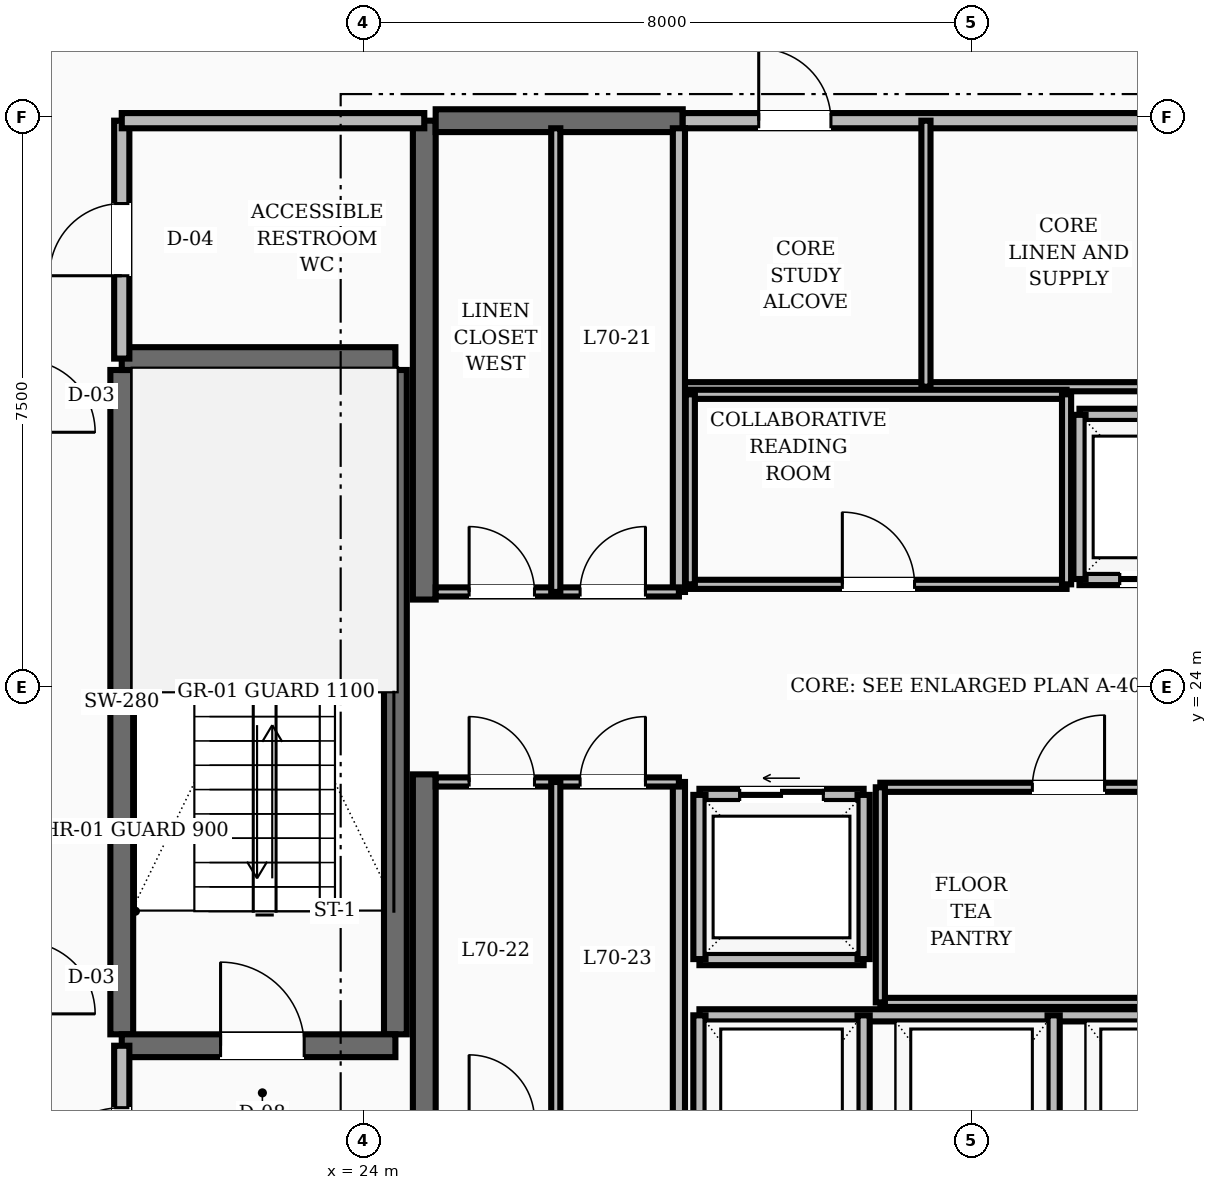
"""IFC4 building model, lengths in metres.
Left out: names, types, materials, properties, quantities, classifications, styles, units other than length and angle.
Written with IfcOpenShell. Run it as: python <this file> out.ifc"""

import sys

from ifc_helpers import new_model, si_unit, direction, frame, frame_2d, origin, place, context, subcontext, project, spatial, rectangle, extrude, element, fill, save


model = new_model("IFC4")
c1 = context("Model", 3, precision=1e-05, world=origin(), true_north=direction((0.0, 1.0)))
c2 = subcontext(c1, "Body", "Model", "MODEL_VIEW")
j1 = project(units=[si_unit("LENGTHUNIT", "METRE"), si_unit("PLANEANGLEUNIT", "RADIAN")], contexts=[c1])
p1 = place(None, origin())
s1 = spatial("IfcSite", under=j1, at=p1, CompositionType="ELEMENT")
p2 = place(p1, origin())
s2 = spatial("IfcBuilding", under=s1, at=p2, CompositionType="ELEMENT")
p3 = place(p2, frame((0.0, 0.0, 268.8)))
s3 = spatial("IfcBuildingStorey", under=s2, at=p3, CompositionType="ELEMENT", Elevation=268.8)
for number, where, z_axis, x_axis in (
    (1, (24.8, 16.55, 0.0), (0.0, 0.0, 1.0), (0.0, 1.0, 0.0)),
    (2, (24.8, 25.15, 0.0), (0.0, 0.0, 1.0), (0.0, 1.0, 0.0)),
):
    element("IfcWall", number, at=place(p3, frame(where, z_axis=z_axis, x_axis=x_axis)), inside=s3, PredefinedType="SHEAR", context=c2, shape_type="SweptSolid", body=[
        extrude(rectangle(XDim=6.3, YDim=0.3, at=frame_2d((3.15, 0.0))), origin(), (0.0, 0.0, 1.0), 3.6),
    ])
p4 = place(p3, frame((24.95, 31.45, 0.0), z_axis=(0.0, 0.0, 1.0), x_axis=(1.0, 0.0, 0.0)))
e3 = element("IfcWall", 3, at=p4, inside=s3, PredefinedType="SHEAR", context=c2, shape_type="SweptSolid", body=[
    extrude(rectangle(XDim=3.25, YDim=0.3, at=frame_2d((1.625, 0.0))), origin(), (0.0, 0.0, 1.0), 3.6),
])
for number, where, z_axis, x_axis in (
    (4, (20.82, 19.43, 0.0), (0.0, 0.0, 1.0), (0.0, 1.0, 0.0)),
    (5, (24.42, 19.43, 0.0), (0.0, 0.0, 1.0), (0.0, 1.0, 0.0)),
):
    element("IfcWall", number, at=place(p3, frame(where, z_axis=z_axis, x_axis=x_axis)), inside=s3, PredefinedType="SHEAR", context=c2, shape_type="SweptSolid", body=[
        extrude(rectangle(XDim=8.74, YDim=0.3, at=frame_2d((4.37, 0.0))), origin(), (0.0, 0.0, 1.0), 3.6),
    ])
p5 = place(p3, frame((20.82, 19.28, 0.0), z_axis=(0.0, 0.0, 1.0), x_axis=(1.0, 0.0, 0.0)))
e6 = element("IfcWall", 6, at=p5, inside=s3, PredefinedType="SHEAR", context=c2, shape_type="SweptSolid", body=[
    extrude(rectangle(XDim=3.6, YDim=0.3, at=frame_2d((1.8, 0.0))), origin(), (0.0, 0.0, 1.0), 3.6),
])
p6 = place(p5, frame((1.3, 0.0, 0.0)))
e7 = element("IfcOpeningElement", 7, at=p6, cuts=e6, PredefinedType="OPENING", context=c2, shape_type="SweptSolid", body=[
    extrude(rectangle(XDim=1.1, YDim=2.1, at=frame_2d((0.55, 1.05))), frame((0.0, 0.16, 0.0), z_axis=(0.0, -1.0, 0.0), x_axis=(1.0, 0.0, 0.0)), (0.0, 0.0, 1.0), 0.32),
])
p7 = place(p3, frame((20.82, 28.32, 0.0), z_axis=(0.0, 0.0, 1.0), x_axis=(1.0, 0.0, 0.0)))
e8 = element("IfcWall", 8, at=p7, inside=s3, PredefinedType="SHEAR", context=c2, shape_type="SweptSolid", body=[
    extrude(rectangle(XDim=3.6, YDim=0.3, at=frame_2d((1.8, 0.0))), origin(), (0.0, 0.0, 1.0), 3.6),
])
p8 = place(p3, frame((20.82, 16.55, 0.0), z_axis=(0.0, 0.0, 1.0), x_axis=(0.0, 1.0, 0.0)))
e9 = element("IfcWall", 9, at=p8, inside=s3, PredefinedType="SOLIDWALL", context=c2, shape_type="SweptSolid", body=[
    extrude(rectangle(XDim=2.73, YDim=0.2, at=frame_2d((1.365, 0.0))), origin(), (0.0, 0.0, 1.0), 2.87),
])
p9 = place(p8, frame((0.815, 0.0, 0.0)))
e10 = element("IfcOpeningElement", 10, at=p9, cuts=e9, PredefinedType="OPENING", context=c2, shape_type="SweptSolid", body=[
    extrude(rectangle(XDim=1.1, YDim=2.1, at=frame_2d((0.55, 1.05))), frame((0.0, 0.11, 0.0), z_axis=(0.0, -1.0, 0.0), x_axis=(1.0, 0.0, 0.0)), (0.0, 0.0, 1.0), 0.22),
])
p10 = place(p3, frame((20.82, 28.32, 0.0), z_axis=(0.0, 0.0, 1.0), x_axis=(0.0, 1.0, 0.0)))
e11 = element("IfcWall", 11, at=p10, inside=s3, PredefinedType="SOLIDWALL", context=c2, shape_type="SweptSolid", body=[
    extrude(rectangle(XDim=3.13, YDim=0.2, at=frame_2d((1.565, 0.0))), origin(), (0.0, 0.0, 1.0), 2.87),
])
p11 = place(p10, frame((1.09, 0.0, 0.0)))
e12 = element("IfcOpeningElement", 12, at=p11, cuts=e11, PredefinedType="OPENING", context=c2, shape_type="SweptSolid", body=[
    extrude(rectangle(XDim=0.95, YDim=2.1, at=frame_2d((0.475, 1.05))), frame((0.0, 0.11, 0.0), z_axis=(0.0, -1.0, 0.0), x_axis=(1.0, 0.0, 0.0)), (0.0, 0.0, 1.0), 0.22),
])
p12 = place(p3, frame((20.82, 31.45, 0.0), z_axis=(0.0, 0.0, 1.0), x_axis=(1.0, 0.0, 0.0)))
e13 = element("IfcWall", 13, at=p12, inside=s3, PredefinedType="SOLIDWALL", context=c2, shape_type="SweptSolid", body=[
    extrude(rectangle(XDim=3.98, YDim=0.2, at=frame_2d((1.99, 0.0))), origin(), (0.0, 0.0, 1.0), 2.87),
])
p13 = place(p3, frame((33.42, 25.42, 0.0), z_axis=(0.0, 0.0, 1.0), x_axis=(1.0, 0.0, 0.0)))
e14 = element("IfcWall", 14, at=p13, inside=s3, PredefinedType="SOLIDWALL", context=c2, shape_type="SweptSolid", body=[
    extrude(rectangle(XDim=2.16, YDim=0.16, at=frame_2d((1.08, 0.0))), origin(), (0.0, 0.0, 1.0), 2.87),
])
p14 = place(p13, frame((0.53, 0.0, 0.0)))
e15 = element("IfcOpeningElement", 15, at=p14, cuts=e14, PredefinedType="OPENING", context=c2, shape_type="SweptSolid", body=[
    extrude(rectangle(XDim=1.1, YDim=2.15, at=frame_2d((0.55, 1.075))), frame((0.0, 0.09, 0.0), z_axis=(0.0, -1.0, 0.0), x_axis=(1.0, 0.0, 0.0)), (0.0, 0.0, 1.0), 0.18),
])
for number, where, z_axis, x_axis in (
    (16, (33.42, 27.58, 0.0), (0.0, 0.0, 1.0), (1.0, 0.0, 0.0)),
    (17, (33.42, 25.42, 0.0), (0.0, 0.0, 1.0), (0.0, 1.0, 0.0)),
):
    element("IfcWall", number, at=place(p3, frame(where, z_axis=z_axis, x_axis=x_axis)), inside=s3, PredefinedType="SOLIDWALL", context=c2, shape_type="SweptSolid", body=[
        extrude(rectangle(XDim=2.16, YDim=0.16, at=frame_2d((1.08, 0.0))), origin(), (0.0, 0.0, 1.0), 2.87),
    ])
p15 = place(p3, frame((28.42, 22.58, 0.0), z_axis=(0.0, 0.0, 1.0), x_axis=(1.0, 0.0, 0.0)))
e18 = element("IfcWall", 18, at=p15, inside=s3, PredefinedType="SOLIDWALL", context=c2, shape_type="SweptSolid", body=[
    extrude(rectangle(XDim=2.16, YDim=0.16, at=frame_2d((1.08, 0.0))), origin(), (0.0, 0.0, 1.0), 2.87),
])
p16 = place(p15, frame((0.53, 0.0, 0.0)))
e19 = element("IfcOpeningElement", 19, at=p16, cuts=e18, PredefinedType="OPENING", context=c2, shape_type="SweptSolid", body=[
    extrude(rectangle(XDim=1.1, YDim=2.15, at=frame_2d((0.55, 1.075))), frame((0.0, 0.09, 0.0), z_axis=(0.0, -1.0, 0.0), x_axis=(1.0, 0.0, 0.0)), (0.0, 0.0, 1.0), 0.18),
])
for number, where, z_axis, x_axis in (
    (20, (28.42, 20.42, 0.0), (0.0, 0.0, 1.0), (1.0, 0.0, 0.0)),
    (21, (28.42, 20.42, 0.0), (0.0, 0.0, 1.0), (0.0, 1.0, 0.0)),
    (22, (30.58, 20.42, 0.0), (0.0, 0.0, 1.0), (0.0, 1.0, 0.0)),
):
    element("IfcWall", number, at=place(p3, frame(where, z_axis=z_axis, x_axis=x_axis)), inside=s3, PredefinedType="SOLIDWALL", context=c2, shape_type="SweptSolid", body=[
        extrude(rectangle(XDim=2.16, YDim=0.16, at=frame_2d((1.08, 0.0))), origin(), (0.0, 0.0, 1.0), 2.87),
    ])
p17 = place(p3, frame((28.42, 19.68, 0.0), z_axis=(0.0, 0.0, 1.0), x_axis=(1.0, 0.0, 0.0)))
e23 = element("IfcWall", 23, at=p17, inside=s3, PredefinedType="SOLIDWALL", context=c2, shape_type="SweptSolid", body=[
    extrude(rectangle(XDim=7.16, YDim=0.16, at=frame_2d((3.58, 0.0))), origin(), (0.0, 0.0, 1.0), 2.87),
])
for number, where, z_axis, x_axis in (
    (24, (28.42, 16.92, 0.0), (0.0, 0.0, 1.0), (0.0, 1.0, 0.0)),
    (25, (30.58, 16.92, 0.0), (0.0, 0.0, 1.0), (0.0, 1.0, 0.0)),
    (26, (33.08, 16.92, 0.0), (0.0, 0.0, 1.0), (0.0, 1.0, 0.0)),
):
    element("IfcWall", number, at=place(p3, frame(where, z_axis=z_axis, x_axis=x_axis)), inside=s3, PredefinedType="SOLIDWALL", context=c2, shape_type="SweptSolid", body=[
        extrude(rectangle(XDim=2.76, YDim=0.16, at=frame_2d((1.38, 0.0))), origin(), (0.0, 0.0, 1.0), 2.87),
    ])
p18 = place(p3, frame((28.2, 31.45, 0.0), z_axis=(0.0, 0.0, 1.0), x_axis=(1.0, 0.0, 0.0)))
e27 = element("IfcWall", 27, at=p18, inside=s3, PredefinedType="SOLIDWALL", context=c2, shape_type="SweptSolid", body=[
    extrude(rectangle(XDim=7.6, YDim=0.2, at=frame_2d((3.8, 0.0))), origin(), (0.0, 0.0, 1.0), 2.87),
])
p19 = place(p18, frame((1.0, 0.0, 0.0)))
e28 = element("IfcOpeningElement", 28, at=p19, cuts=e27, PredefinedType="OPENING", context=c2, shape_type="SweptSolid", body=[
    extrude(rectangle(XDim=0.95, YDim=2.1, at=frame_2d((0.475, 1.05))), frame((0.0, 0.11, 0.0), z_axis=(0.0, -1.0, 0.0), x_axis=(1.0, 0.0, 0.0)), (0.0, 0.0, 1.0), 0.22),
])
p20 = place(p3, frame((28.2, 27.95, 0.0), z_axis=(0.0, 0.0, 1.0), x_axis=(1.0, 0.0, 0.0)))
e29 = element("IfcWall", 29, at=p20, inside=s3, PredefinedType="PARTITIONING", context=c2, shape_type="SweptSolid", body=[
    extrude(rectangle(XDim=7.6, YDim=0.12, at=frame_2d((3.8, 0.0))), origin(), (0.0, 0.0, 1.0), 2.87),
])
p21 = place(p3, frame((31.4, 27.95, 0.0), z_axis=(0.0, 0.0, 1.0), x_axis=(0.0, 1.0, 0.0)))
e30 = element("IfcWall", 30, at=p21, inside=s3, PredefinedType="PARTITIONING", context=c2, shape_type="SweptSolid", body=[
    extrude(rectangle(XDim=3.5, YDim=0.12, at=frame_2d((1.75, 0.0))), origin(), (0.0, 0.0, 1.0), 2.87),
])
p22 = place(p3, frame((28.3, 25.35, 0.0), z_axis=(0.0, 0.0, 1.0), x_axis=(1.0, 0.0, 0.0)))
e31 = element("IfcWall", 31, at=p22, inside=s3, PredefinedType="PARTITIONING", context=c2, shape_type="SweptSolid", body=[
    extrude(rectangle(XDim=4.95, YDim=0.12, at=frame_2d((2.475, 0.0))), origin(), (0.0, 0.0, 1.0), 2.87),
])
p23 = place(p22, frame((2.0, 0.0, 0.0)))
e32 = element("IfcOpeningElement", 32, at=p23, cuts=e31, PredefinedType="OPENING", context=c2, shape_type="SweptSolid", body=[
    extrude(rectangle(XDim=0.95, YDim=2.1, at=frame_2d((0.475, 1.05))), frame((0.0, 0.07, 0.0), z_axis=(0.0, -1.0, 0.0), x_axis=(1.0, 0.0, 0.0)), (0.0, 0.0, 1.0), 0.14),
])
p24 = place(p3, frame((28.3, 27.85, 0.0), z_axis=(0.0, 0.0, 1.0), x_axis=(1.0, 0.0, 0.0)))
e33 = element("IfcWall", 33, at=p24, inside=s3, PredefinedType="PARTITIONING", context=c2, shape_type="SweptSolid", body=[
    extrude(rectangle(XDim=4.95, YDim=0.12, at=frame_2d((2.475, 0.0))), origin(), (0.0, 0.0, 1.0), 2.87),
])
for number, where, z_axis, x_axis in (
    (34, (28.3, 25.35, 0.0), (0.0, 0.0, 1.0), (0.0, 1.0, 0.0)),
    (35, (33.25, 25.35, 0.0), (0.0, 0.0, 1.0), (0.0, 1.0, 0.0)),
):
    element("IfcWall", number, at=place(p3, frame(where, z_axis=z_axis, x_axis=x_axis)), inside=s3, PredefinedType="PARTITIONING", context=c2, shape_type="SweptSolid", body=[
        extrude(rectangle(XDim=2.5, YDim=0.12, at=frame_2d((1.25, 0.0))), origin(), (0.0, 0.0, 1.0), 2.87),
    ])
p25 = place(p3, frame((30.8, 22.68, 0.0), z_axis=(0.0, 0.0, 1.0), x_axis=(1.0, 0.0, 0.0)))
e36 = element("IfcWall", 36, at=p25, inside=s3, PredefinedType="PARTITIONING", context=c2, shape_type="SweptSolid", body=[
    extrude(rectangle(XDim=4.95, YDim=0.12, at=frame_2d((2.475, 0.0))), origin(), (0.0, 0.0, 1.0), 2.87),
])
p26 = place(p25, frame((2.0, 0.0, 0.0)))
e37 = element("IfcOpeningElement", 37, at=p26, cuts=e36, PredefinedType="OPENING", context=c2, shape_type="SweptSolid", body=[
    extrude(rectangle(XDim=0.95, YDim=2.1, at=frame_2d((0.475, 1.05))), frame((0.0, 0.07, 0.0), z_axis=(0.0, -1.0, 0.0), x_axis=(1.0, 0.0, 0.0)), (0.0, 0.0, 1.0), 0.14),
])
p27 = place(p3, frame((30.8, 19.85, 0.0), z_axis=(0.0, 0.0, 1.0), x_axis=(1.0, 0.0, 0.0)))
e38 = element("IfcWall", 38, at=p27, inside=s3, PredefinedType="PARTITIONING", context=c2, shape_type="SweptSolid", body=[
    extrude(rectangle(XDim=4.95, YDim=0.12, at=frame_2d((2.475, 0.0))), origin(), (0.0, 0.0, 1.0), 2.87),
])
p28 = place(p3, frame((30.8, 19.85, 0.0), z_axis=(0.0, 0.0, 1.0), x_axis=(0.0, 1.0, 0.0)))
e39 = element("IfcWall", 39, at=p28, inside=s3, PredefinedType="PARTITIONING", context=c2, shape_type="SweptSolid", body=[
    extrude(rectangle(XDim=2.83, YDim=0.12, at=frame_2d((1.415, 0.0))), origin(), (0.0, 0.0, 1.0), 2.87),
])
p29 = place(p3, frame((28.15, 16.7, 0.0), z_axis=(0.0, 0.0, 1.0), x_axis=(0.0, 1.0, 0.0)))
e40 = element("IfcWall", 40, at=p29, inside=s3, PredefinedType="SOLIDWALL", context=c2, shape_type="SweptSolid", body=[
    extrude(rectangle(XDim=6.05, YDim=0.16, at=frame_2d((3.025, 0.0))), origin(), (0.0, 0.0, 1.0), 2.87),
])
p30 = place(p3, frame((28.15, 25.25, 0.0), z_axis=(0.0, 0.0, 1.0), x_axis=(0.0, 1.0, 0.0)))
e41 = element("IfcWall", 41, at=p30, inside=s3, PredefinedType="SOLIDWALL", context=c2, shape_type="SweptSolid", body=[
    extrude(rectangle(XDim=6.1, YDim=0.16, at=frame_2d((3.05, 0.0))), origin(), (0.0, 0.0, 1.0), 2.87),
])
p31 = place(p3, frame((24.95, 25.25, 0.0), z_axis=(0.0, 0.0, 1.0), x_axis=(1.0, 0.0, 0.0)))
e42 = element("IfcWall", 42, at=p31, inside=s3, PredefinedType="PARTITIONING", context=c2, shape_type="SweptSolid", body=[
    extrude(rectangle(XDim=3.2, YDim=0.12, at=frame_2d((1.6, 0.0))), origin(), (0.0, 0.0, 1.0), 2.87),
])
p32 = place(p31, frame((0.44, 0.0, 0.0)))
e43 = element("IfcOpeningElement", 43, at=p32, cuts=e42, PredefinedType="OPENING", context=c2, shape_type="SweptSolid", body=[
    extrude(rectangle(XDim=0.86, YDim=2.1, at=frame_2d((0.43, 1.05))), frame((0.0, 0.07, 0.0), z_axis=(0.0, -1.0, 0.0), x_axis=(1.0, 0.0, 0.0)), (0.0, 0.0, 1.0), 0.14),
])
p33 = place(p31, frame((1.9, 0.0, 0.0)))
e44 = element("IfcOpeningElement", 44, at=p33, cuts=e42, PredefinedType="OPENING", context=c2, shape_type="SweptSolid", body=[
    extrude(rectangle(XDim=0.86, YDim=2.1, at=frame_2d((0.43, 1.05))), frame((0.0, 0.07, 0.0), z_axis=(0.0, -1.0, 0.0), x_axis=(1.0, 0.0, 0.0)), (0.0, 0.0, 1.0), 0.14),
])
p34 = place(p3, frame((24.95, 22.75, 0.0), z_axis=(0.0, 0.0, 1.0), x_axis=(1.0, 0.0, 0.0)))
e45 = element("IfcWall", 45, at=p34, inside=s3, PredefinedType="PARTITIONING", context=c2, shape_type="SweptSolid", body=[
    extrude(rectangle(XDim=3.2, YDim=0.12, at=frame_2d((1.6, 0.0))), origin(), (0.0, 0.0, 1.0), 2.87),
])
p35 = place(p34, frame((0.44, 0.0, 0.0)))
e46 = element("IfcOpeningElement", 46, at=p35, cuts=e45, PredefinedType="OPENING", context=c2, shape_type="SweptSolid", body=[
    extrude(rectangle(XDim=0.86, YDim=2.1, at=frame_2d((0.43, 1.05))), frame((0.0, 0.07, 0.0), z_axis=(0.0, -1.0, 0.0), x_axis=(1.0, 0.0, 0.0)), (0.0, 0.0, 1.0), 0.14),
])
p36 = place(p34, frame((1.9, 0.0, 0.0)))
e47 = element("IfcOpeningElement", 47, at=p36, cuts=e45, PredefinedType="OPENING", context=c2, shape_type="SweptSolid", body=[
    extrude(rectangle(XDim=0.86, YDim=2.1, at=frame_2d((0.43, 1.05))), frame((0.0, 0.07, 0.0), z_axis=(0.0, -1.0, 0.0), x_axis=(1.0, 0.0, 0.0)), (0.0, 0.0, 1.0), 0.14),
])
p37 = place(p3, frame((26.53, 25.25, 0.0), z_axis=(0.0, 0.0, 1.0), x_axis=(0.0, 1.0, 0.0)))
e48 = element("IfcWall", 48, at=p37, inside=s3, PredefinedType="PARTITIONING", context=c2, shape_type="SweptSolid", body=[
    extrude(rectangle(XDim=6.1, YDim=0.12, at=frame_2d((3.05, 0.0))), origin(), (0.0, 0.0, 1.0), 2.87),
])
p38 = place(p3, frame((26.53, 18.3, 0.0), z_axis=(0.0, 0.0, 1.0), x_axis=(0.0, 1.0, 0.0)))
e49 = element("IfcWall", 49, at=p38, inside=s3, PredefinedType="PARTITIONING", context=c2, shape_type="SweptSolid", body=[
    extrude(rectangle(XDim=4.45, YDim=0.12, at=frame_2d((2.225, 0.0))), origin(), (0.0, 0.0, 1.0), 2.87),
])
p39 = place(p3, frame((21.635, 34.365, 0.0), z_axis=(0.0, 0.0, 1.0), x_axis=(-0.707106781187, -0.707106781187, 0.0)))
e50 = element("IfcWall", 50, at=p39, inside=s3, PredefinedType="SOLIDWALL", context=c2, shape_type="SweptSolid", body=[
    extrude(rectangle(XDim=2.916, YDim=0.16, at=frame_2d((1.458, 0.0))), origin(), (0.0, 0.0, 1.0), 2.87),
])
p40 = place(p6, origin())
e51 = element("IfcDoor", 51, at=p40, inside=s3, OperationType="SINGLE_SWING_LEFT", PredefinedType="DOOR", context=c2, shape_type="SweptSolid", body=[
    extrude(rectangle(XDim=1.1, YDim=2.1, at=frame_2d((0.55, 1.05))), frame((0.0, 0.025, 0.0), z_axis=(0.0, -1.0, 0.0), x_axis=(1.0, 0.0, 0.0)), (0.0, 0.0, 1.0), 0.05),
])
fill(e7, e51)
p41 = place(p9, origin())
e52 = element("IfcDoor", 52, at=p41, inside=s3, OperationType="SINGLE_SWING_LEFT", PredefinedType="DOOR", context=c2, shape_type="SweptSolid", body=[
    extrude(rectangle(XDim=1.1, YDim=2.1, at=frame_2d((0.55, 1.05))), frame((0.0, 0.025, 0.0), z_axis=(0.0, -1.0, 0.0), x_axis=(1.0, 0.0, 0.0)), (0.0, 0.0, 1.0), 0.05),
])
fill(e10, e52)
p42 = place(p11, origin())
e53 = element("IfcDoor", 53, at=p42, inside=s3, OperationType="SINGLE_SWING_LEFT", PredefinedType="DOOR", context=c2, shape_type="SweptSolid", body=[
    extrude(rectangle(XDim=0.95, YDim=2.1, at=frame_2d((0.475, 1.05))), frame((0.0, 0.025, 0.0), z_axis=(0.0, -1.0, 0.0), x_axis=(1.0, 0.0, 0.0)), (0.0, 0.0, 1.0), 0.05),
])
fill(e12, e53)
p43 = place(p14, origin())
e54 = element("IfcDoor", 54, at=p43, inside=s3, OperationType="SLIDING_TO_RIGHT", PredefinedType="DOOR", context=c2, shape_type="SweptSolid", body=[
    extrude(rectangle(XDim=1.1, YDim=2.15, at=frame_2d((0.55, 1.075))), frame((0.0, 0.025, 0.0), z_axis=(0.0, -1.0, 0.0), x_axis=(1.0, 0.0, 0.0)), (0.0, 0.0, 1.0), 0.05),
])
fill(e15, e54)
p44 = place(p16, origin())
e55 = element("IfcDoor", 55, at=p44, inside=s3, OperationType="SLIDING_TO_LEFT", PredefinedType="DOOR", context=c2, shape_type="SweptSolid", body=[
    extrude(rectangle(XDim=1.1, YDim=2.15, at=frame_2d((0.55, 1.075))), frame((0.0, 0.025, 0.0), z_axis=(0.0, -1.0, 0.0), x_axis=(1.0, 0.0, 0.0)), (0.0, 0.0, 1.0), 0.05),
])
fill(e19, e55)
p45 = place(p19, origin())
e56 = element("IfcDoor", 56, at=p45, inside=s3, OperationType="SINGLE_SWING_LEFT", PredefinedType="DOOR", context=c2, shape_type="SweptSolid", body=[
    extrude(rectangle(XDim=0.95, YDim=2.1, at=frame_2d((0.475, 1.05))), frame((0.0, 0.025, 0.0), z_axis=(0.0, -1.0, 0.0), x_axis=(1.0, 0.0, 0.0)), (0.0, 0.0, 1.0), 0.05),
])
fill(e28, e56)
p46 = place(p23, origin())
e57 = element("IfcDoor", 57, at=p46, inside=s3, OperationType="SINGLE_SWING_LEFT", PredefinedType="DOOR", context=c2, shape_type="SweptSolid", body=[
    extrude(rectangle(XDim=0.95, YDim=2.1, at=frame_2d((0.475, 1.05))), frame((0.0, 0.025, 0.0), z_axis=(0.0, -1.0, 0.0), x_axis=(1.0, 0.0, 0.0)), (0.0, 0.0, 1.0), 0.05),
])
fill(e32, e57)
p47 = place(p26, origin())
e58 = element("IfcDoor", 58, at=p47, inside=s3, OperationType="SINGLE_SWING_RIGHT", PredefinedType="DOOR", context=c2, shape_type="SweptSolid", body=[
    extrude(rectangle(XDim=0.95, YDim=2.1, at=frame_2d((0.475, 1.05))), frame((0.0, 0.025, 0.0), z_axis=(0.0, -1.0, 0.0), x_axis=(1.0, 0.0, 0.0)), (0.0, 0.0, 1.0), 0.05),
])
fill(e37, e58)
p48 = place(p32, origin())
e59 = element("IfcDoor", 59, at=p48, inside=s3, OperationType="SINGLE_SWING_LEFT", PredefinedType="DOOR", context=c2, shape_type="SweptSolid", body=[
    extrude(rectangle(XDim=0.86, YDim=2.1, at=frame_2d((0.43, 1.05))), frame((0.0, 0.025, 0.0), z_axis=(0.0, -1.0, 0.0), x_axis=(1.0, 0.0, 0.0)), (0.0, 0.0, 1.0), 0.05),
])
fill(e43, e59)
p49 = place(p33, origin())
e60 = element("IfcDoor", 60, at=p49, inside=s3, OperationType="SINGLE_SWING_RIGHT", PredefinedType="DOOR", context=c2, shape_type="SweptSolid", body=[
    extrude(rectangle(XDim=0.86, YDim=2.1, at=frame_2d((0.43, 1.05))), frame((0.0, 0.025, 0.0), z_axis=(0.0, -1.0, 0.0), x_axis=(1.0, 0.0, 0.0)), (0.0, 0.0, 1.0), 0.05),
])
fill(e44, e60)
p50 = place(p35, origin())
e61 = element("IfcDoor", 61, at=p50, inside=s3, OperationType="SINGLE_SWING_LEFT", PredefinedType="DOOR", context=c2, shape_type="SweptSolid", body=[
    extrude(rectangle(XDim=0.86, YDim=2.1, at=frame_2d((0.43, 1.05))), frame((0.0, 0.025, 0.0), z_axis=(0.0, -1.0, 0.0), x_axis=(1.0, 0.0, 0.0)), (0.0, 0.0, 1.0), 0.05),
])
fill(e46, e61)
p51 = place(p36, origin())
e62 = element("IfcDoor", 62, at=p51, inside=s3, OperationType="SINGLE_SWING_RIGHT", PredefinedType="DOOR", context=c2, shape_type="SweptSolid", body=[
    extrude(rectangle(XDim=0.86, YDim=2.1, at=frame_2d((0.43, 1.05))), frame((0.0, 0.025, 0.0), z_axis=(0.0, -1.0, 0.0), x_axis=(1.0, 0.0, 0.0)), (0.0, 0.0, 1.0), 0.05),
])
fill(e47, e62)
save(model, sys.argv[1])
